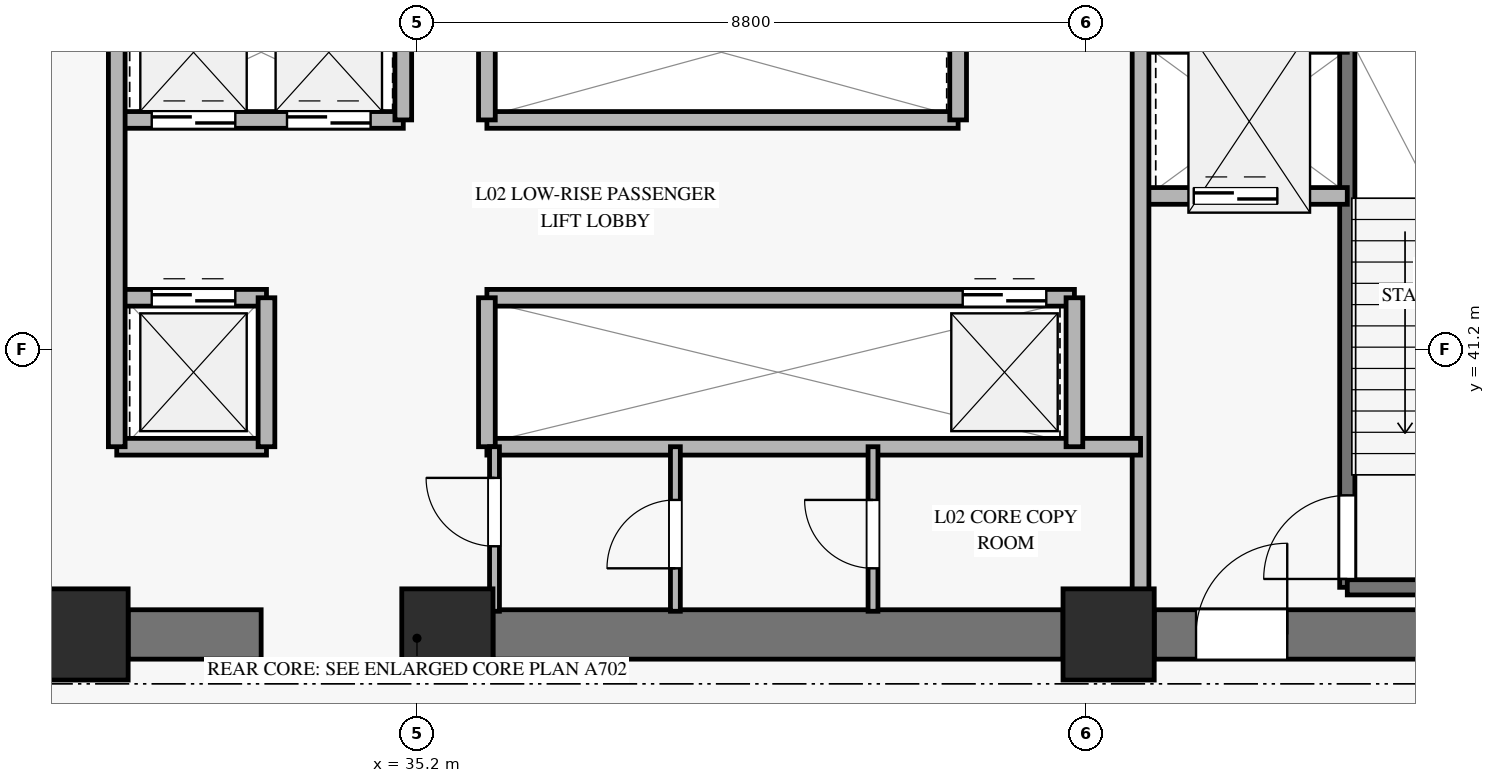
"""IFC4 building model, lengths in metres.
Left out: names, types, materials, properties, quantities, classifications, styles, units other than length and angle.
Written with IfcOpenShell. Run it as: python <this file> out.ifc"""

import sys

from ifc_helpers import new_model, si_unit, direction, frame, frame_2d, origin, origin_2d, place, context, subcontext, project, spatial, rectangle, extrude, source, transform, mapped, element, fill, save


model = new_model("IFC4")
c1 = context("Model", 3, precision=1e-05, world=origin(), true_north=direction((0.0, 1.0)))
c2 = subcontext(c1, "Body", "Model", "MODEL_VIEW")
j1 = project(units=[si_unit("LENGTHUNIT", "METRE"), si_unit("PLANEANGLEUNIT", "RADIAN")], contexts=[c1])
p1 = place(None, origin())
s1 = spatial("IfcSite", under=j1, at=p1, CompositionType="ELEMENT")
p2 = place(p1, origin())
s2 = spatial("IfcBuilding", under=s1, at=p2, CompositionType="ELEMENT")
p3 = place(p2, frame((0.0, 0.0, 5.6)))
s3 = spatial("IfcBuildingStorey", under=s2, at=p3, CompositionType="ELEMENT", Elevation=5.6)
m1 = source(origin(), c2, "Body", "SweptSolid", [
    extrude(rectangle(XDim=1.2, YDim=1.2, at=origin_2d()), origin(), (0.0, 0.0, 1.0), 4.54),
])
for number, where, z_axis, x_axis in (
    (1, (30.8, 37.45, 0.0), (0.0, 0.0, 1.0), (1.0, 0.0, 0.0)),
    (2, (35.6, 37.45, 0.0), (0.0, 0.0, 1.0), (1.0, 0.0, 0.0)),
    (3, (44.3, 37.45, 0.0), (0.0, 0.0, 1.0), (1.0, 0.0, 0.0)),
):
    element("IfcColumn", number, at=place(p3, frame(where, z_axis=z_axis, x_axis=x_axis)), inside=s3, PredefinedType="PILASTER", context=c2, shape_type="MappedRepresentation", body=[
        mapped(m1, transform((0.0, 0.0, 0.0), x_axis=(1.0, 0.0, 0.0), y_axis=(0.0, 1.0, 0.0), z_axis=(0.0, 0.0, 1.0), scale=1.0)),
    ])
p4 = place(p3, frame((31.4, 37.45, 0.0), z_axis=(0.0, 0.0, 1.0), x_axis=(1.0, 0.0, 0.0)))
e4 = element("IfcWall", 4, at=p4, inside=s3, PredefinedType="SHEAR", context=c2, shape_type="SweptSolid", body=[
    extrude(rectangle(XDim=1.75, YDim=0.65, at=frame_2d((0.875, 0.0))), origin(), (0.0, 0.0, 1.0), 4.54),
])
p5 = place(p3, frame((36.2, 37.45, 0.0), z_axis=(0.0, 0.0, 1.0), x_axis=(1.0, 0.0, 0.0)))
e5 = element("IfcWall", 5, at=p5, inside=s3, PredefinedType="SHEAR", context=c2, shape_type="SweptSolid", body=[
    extrude(rectangle(XDim=7.5, YDim=0.65, at=frame_2d((3.75, 0.0))), origin(), (0.0, 0.0, 1.0), 4.54),
])
p6 = place(p3, frame((44.9, 37.45, 0.0), z_axis=(0.0, 0.0, 1.0), x_axis=(1.0, 0.0, 0.0)))
e6 = element("IfcWall", 6, at=p6, inside=s3, PredefinedType="SHEAR", context=c2, shape_type="SweptSolid", body=[
    extrude(rectangle(XDim=5.05, YDim=0.65, at=frame_2d((2.525, 0.0))), origin(), (0.0, 0.0, 1.0), 4.54),
])
p7 = place(p6, frame((0.55, 0.0, 0.0)))
e7 = element("IfcOpeningElement", 7, at=p7, cuts=e6, PredefinedType="OPENING", context=c2, shape_type="SweptSolid", body=[
    extrude(rectangle(XDim=1.2, YDim=2.15, at=frame_2d((0.6, 1.075))), frame((0.0, 0.335, 0.0), z_axis=(0.0, -1.0, 0.0), x_axis=(1.0, 0.0, 0.0)), (0.0, 0.0, 1.0), 0.67),
])
p8 = place(p3, frame((47.44, 38.07, 0.0), z_axis=(0.0, 0.0, 1.0), x_axis=(0.0, 1.0, 0.0)))
e8 = element("IfcWall", 8, at=p8, inside=s3, PredefinedType="SOLIDWALL", context=c2, shape_type="SweptSolid", body=[
    extrude(rectangle(XDim=7.25, YDim=0.2, at=frame_2d((3.625, 0.0))), origin(), (0.0, 0.0, 1.0), 4.8),
])
p9 = place(p8, frame((0.11, 0.0, 0.0)))
e9 = element("IfcOpeningElement", 9, at=p9, cuts=e8, PredefinedType="OPENING", context=c2, shape_type="SweptSolid", body=[
    extrude(rectangle(XDim=1.1, YDim=2.15, at=frame_2d((0.55, 1.075))), frame((0.0, 0.11, 0.0), z_axis=(0.0, -1.0, 0.0), x_axis=(1.0, 0.0, 0.0)), (0.0, 0.0, 1.0), 0.22),
])
p10 = place(p3, frame((47.44, 38.07, 0.0), z_axis=(0.0, 0.0, 1.0), x_axis=(1.0, 0.0, 0.0)))
e10 = element("IfcWall", 10, at=p10, inside=s3, PredefinedType="SOLIDWALL", context=c2, shape_type="SweptSolid", body=[
    extrude(rectangle(XDim=2.805, YDim=0.2, at=frame_2d((1.403, 0.0))), origin(), (0.0, 0.0, 1.0), 4.8),
])
p11 = place(p3, frame((44.72, 43.22, 0.0), z_axis=(0.0, 0.0, 1.0), x_axis=(1.0, 0.0, 0.0)))
e11 = element("IfcWall", 11, at=p11, inside=s3, PredefinedType="SOLIDWALL", context=c2, shape_type="SweptSolid", body=[
    extrude(rectangle(XDim=2.72, YDim=0.22, at=frame_2d((1.36, 0.0))), origin(), (0.0, 0.0, 1.0), 4.54),
])
p12 = place(p11, frame((0.7, 0.0, 0.0)))
e12 = element("IfcOpeningElement", 12, at=p12, cuts=e11, PredefinedType="OPENING", context=c2, shape_type="SweptSolid", body=[
    extrude(rectangle(XDim=1.1, YDim=2.2, at=frame_2d((0.55, 1.1))), frame((0.0, 0.12, 0.0), z_axis=(0.0, -1.0, 0.0), x_axis=(1.0, 0.0, 0.0)), (0.0, 0.0, 1.0), 0.24),
])
p13 = place(p3, frame((44.72, 45.22, 0.0), z_axis=(0.0, 0.0, 1.0), x_axis=(1.0, 0.0, 0.0)))
e13 = element("IfcWall", 13, at=p13, inside=s3, PredefinedType="SOLIDWALL", context=c2, shape_type="SweptSolid", body=[
    extrude(rectangle(XDim=2.72, YDim=0.22, at=frame_2d((1.36, 0.0))), origin(), (0.0, 0.0, 1.0), 4.54),
])
p14 = place(p3, frame((44.72, 37.755, 0.0), z_axis=(0.0, 0.0, 1.0), x_axis=(0.0, 1.0, 0.0)))
e14 = element("IfcWall", 14, at=p14, inside=s3, PredefinedType="SOLIDWALL", context=c2, shape_type="SweptSolid", body=[
    extrude(rectangle(XDim=7.465, YDim=0.22, at=frame_2d((3.732, 0.0))), origin(), (0.0, 0.0, 1.0), 4.54),
])
p15 = place(p3, frame((31.25, 44.22, 0.0), z_axis=(0.0, 0.0, 1.0), x_axis=(1.0, 0.0, 0.0)))
e15 = element("IfcWall", 15, at=p15, inside=s3, PredefinedType="SOLIDWALL", context=c2, shape_type="SweptSolid", body=[
    extrude(rectangle(XDim=3.77, YDim=0.22, at=frame_2d((1.885, 0.0))), origin(), (0.0, 0.0, 1.0), 4.54),
])
p16 = place(p15, frame((0.46, 0.0, 0.0)))
e16 = element("IfcOpeningElement", 16, at=p16, cuts=e15, PredefinedType="OPENING", context=c2, shape_type="SweptSolid", body=[
    extrude(rectangle(XDim=1.1, YDim=2.2, at=frame_2d((0.55, 1.1))), frame((0.0, 0.12, 0.0), z_axis=(0.0, -1.0, 0.0), x_axis=(1.0, 0.0, 0.0)), (0.0, 0.0, 1.0), 0.24),
])
p17 = place(p15, frame((2.24, 0.0, 0.0)))
e17 = element("IfcOpeningElement", 17, at=p17, cuts=e15, PredefinedType="OPENING", context=c2, shape_type="SweptSolid", body=[
    extrude(rectangle(XDim=1.1, YDim=2.2, at=frame_2d((0.55, 1.1))), frame((0.0, 0.12, 0.0), z_axis=(0.0, -1.0, 0.0), x_axis=(1.0, 0.0, 0.0)), (0.0, 0.0, 1.0), 0.24),
])
p18 = place(p3, frame((36.12, 44.22, 0.0), z_axis=(0.0, 0.0, 1.0), x_axis=(1.0, 0.0, 0.0)))
e18 = element("IfcWall", 18, at=p18, inside=s3, PredefinedType="SOLIDWALL", context=c2, shape_type="SweptSolid", body=[
    extrude(rectangle(XDim=6.2, YDim=0.22, at=frame_2d((3.1, 0.0))), origin(), (0.0, 0.0, 1.0), 4.54),
])
for number, where, z_axis, x_axis in (
    (19, (35.02, 44.22, 0.0), (0.0, 0.0, 1.0), (0.0, 1.0, 0.0)),
    (20, (36.12, 44.22, 0.0), (0.0, 0.0, 1.0), (0.0, 1.0, 0.0)),
    (21, (42.32, 44.22, 0.0), (0.0, 0.0, 1.0), (0.0, 1.0, 0.0)),
):
    element("IfcWall", number, at=place(p3, frame(where, z_axis=z_axis, x_axis=x_axis)), inside=s3, PredefinedType="SOLIDWALL", context=c2, shape_type="SweptSolid", body=[
        extrude(rectangle(XDim=2.025, YDim=0.22, at=frame_2d((1.013, 0.0))), origin(), (0.0, 0.0, 1.0), 4.54),
    ])
p19 = place(p3, frame((31.25, 41.88, 0.0), z_axis=(0.0, 0.0, 1.0), x_axis=(1.0, 0.0, 0.0)))
e22 = element("IfcWall", 22, at=p19, inside=s3, PredefinedType="SOLIDWALL", context=c2, shape_type="SweptSolid", body=[
    extrude(rectangle(XDim=1.97, YDim=0.22, at=frame_2d((0.985, 0.0))), origin(), (0.0, 0.0, 1.0), 4.54),
])
p20 = place(p19, frame((0.46, 0.0, 0.0)))
e23 = element("IfcOpeningElement", 23, at=p20, cuts=e22, PredefinedType="OPENING", context=c2, shape_type="SweptSolid", body=[
    extrude(rectangle(XDim=1.1, YDim=2.2, at=frame_2d((0.55, 1.1))), frame((0.0, 0.12, 0.0), z_axis=(0.0, -1.0, 0.0), x_axis=(1.0, 0.0, 0.0)), (0.0, 0.0, 1.0), 0.24),
])
p21 = place(p3, frame((36.12, 41.88, 0.0), z_axis=(0.0, 0.0, 1.0), x_axis=(1.0, 0.0, 0.0)))
e24 = element("IfcWall", 24, at=p21, inside=s3, PredefinedType="SOLIDWALL", context=c2, shape_type="SweptSolid", body=[
    extrude(rectangle(XDim=7.73, YDim=0.22, at=frame_2d((3.865, 0.0))), origin(), (0.0, 0.0, 1.0), 4.54),
])
p22 = place(p21, frame((6.26, 0.0, 0.0)))
e25 = element("IfcOpeningElement", 25, at=p22, cuts=e24, PredefinedType="OPENING", context=c2, shape_type="SweptSolid", body=[
    extrude(rectangle(XDim=1.1, YDim=2.2, at=frame_2d((0.55, 1.1))), frame((0.0, 0.12, 0.0), z_axis=(0.0, -1.0, 0.0), x_axis=(1.0, 0.0, 0.0)), (0.0, 0.0, 1.0), 0.24),
])
p23 = place(p3, frame((31.25, 39.92, 0.0), z_axis=(0.0, 0.0, 1.0), x_axis=(1.0, 0.0, 0.0)))
e26 = element("IfcWall", 26, at=p23, inside=s3, PredefinedType="SOLIDWALL", context=c2, shape_type="SweptSolid", body=[
    extrude(rectangle(XDim=1.97, YDim=0.22, at=frame_2d((0.985, 0.0))), origin(), (0.0, 0.0, 1.0), 4.54),
])
p24 = place(p3, frame((33.22, 39.92, 0.0), z_axis=(0.0, 0.0, 1.0), x_axis=(0.0, 1.0, 0.0)))
e27 = element("IfcWall", 27, at=p24, inside=s3, PredefinedType="SOLIDWALL", context=c2, shape_type="SweptSolid", body=[
    extrude(rectangle(XDim=1.96, YDim=0.22, at=frame_2d((0.98, 0.0))), origin(), (0.0, 0.0, 1.0), 4.54),
])
p25 = place(p3, frame((36.12, 39.92, 0.0), z_axis=(0.0, 0.0, 1.0), x_axis=(1.0, 0.0, 0.0)))
e28 = element("IfcWall", 28, at=p25, inside=s3, PredefinedType="SOLIDWALL", context=c2, shape_type="SweptSolid", body=[
    extrude(rectangle(XDim=8.6, YDim=0.22, at=frame_2d((4.3, 0.0))), origin(), (0.0, 0.0, 1.0), 3.825),
])
p26 = place(p3, frame((36.12, 39.92, 0.0), z_axis=(0.0, 0.0, 1.0), x_axis=(0.0, 1.0, 0.0)))
e29 = element("IfcWall", 29, at=p26, inside=s3, PredefinedType="SOLIDWALL", context=c2, shape_type="SweptSolid", body=[
    extrude(rectangle(XDim=1.96, YDim=0.22, at=frame_2d((0.98, 0.0))), origin(), (0.0, 0.0, 1.0), 4.54),
])
p27 = place(p3, frame((31.25, 39.92, 0.0), z_axis=(0.0, 0.0, 1.0), x_axis=(0.0, 1.0, 0.0)))
e30 = element("IfcWall", 30, at=p27, inside=s3, PredefinedType="SOLIDWALL", context=c2, shape_type="SweptSolid", body=[
    extrude(rectangle(XDim=6.325, YDim=0.22, at=frame_2d((3.163, 0.0))), origin(), (0.0, 0.0, 1.0), 4.54),
])
p28 = place(p3, frame((43.85, 39.92, 0.0), z_axis=(0.0, 0.0, 1.0), x_axis=(0.0, 1.0, 0.0)))
e31 = element("IfcWall", 31, at=p28, inside=s3, PredefinedType="SOLIDWALL", context=c2, shape_type="SweptSolid", body=[
    extrude(rectangle(XDim=1.96, YDim=0.22, at=frame_2d((0.98, 0.0))), origin(), (0.0, 0.0, 1.0), 4.54),
])
p29 = place(p3, frame((36.22, 37.755, 0.0), z_axis=(0.0, 0.0, 1.0), x_axis=(0.0, 1.0, 0.0)))
e32 = element("IfcWall", 32, at=p29, inside=s3, PredefinedType="PARTITIONING", context=c2, shape_type="SweptSolid", body=[
    extrude(rectangle(XDim=2.165, YDim=0.13, at=frame_2d((1.083, 0.0))), origin(), (0.0, 0.0, 1.0), 4.54),
])
p30 = place(p29, frame((0.855, 0.0, 0.0)))
e33 = element("IfcOpeningElement", 33, at=p30, cuts=e32, PredefinedType="OPENING", context=c2, shape_type="SweptSolid", body=[
    extrude(rectangle(XDim=0.9, YDim=2.1, at=frame_2d((0.45, 1.05))), frame((0.0, 0.075, 0.0), z_axis=(0.0, -1.0, 0.0), x_axis=(1.0, 0.0, 0.0)), (0.0, 0.0, 1.0), 0.15),
])
p31 = place(p3, frame((38.6, 37.755, 0.0), z_axis=(0.0, 0.0, 1.0), x_axis=(0.0, 1.0, 0.0)))
e34 = element("IfcWall", 34, at=p31, inside=s3, PredefinedType="PARTITIONING", context=c2, shape_type="SweptSolid", body=[
    extrude(rectangle(XDim=2.165, YDim=0.13, at=frame_2d((1.083, 0.0))), origin(), (0.0, 0.0, 1.0), 4.54),
])
p32 = place(p31, frame((0.565, 0.0, 0.0)))
e35 = element("IfcOpeningElement", 35, at=p32, cuts=e34, PredefinedType="OPENING", context=c2, shape_type="SweptSolid", body=[
    extrude(rectangle(XDim=0.9, YDim=2.1, at=frame_2d((0.45, 1.05))), frame((0.0, 0.075, 0.0), z_axis=(0.0, -1.0, 0.0), x_axis=(1.0, 0.0, 0.0)), (0.0, 0.0, 1.0), 0.15),
])
p33 = place(p3, frame((41.2, 37.755, 0.0), z_axis=(0.0, 0.0, 1.0), x_axis=(0.0, 1.0, 0.0)))
e36 = element("IfcWall", 36, at=p33, inside=s3, PredefinedType="PARTITIONING", context=c2, shape_type="SweptSolid", body=[
    extrude(rectangle(XDim=2.165, YDim=0.13, at=frame_2d((1.083, 0.0))), origin(), (0.0, 0.0, 1.0), 4.54),
])
p34 = place(p33, frame((0.565, 0.0, 0.0)))
e37 = element("IfcOpeningElement", 37, at=p34, cuts=e36, PredefinedType="OPENING", context=c2, shape_type="SweptSolid", body=[
    extrude(rectangle(XDim=0.9, YDim=2.1, at=frame_2d((0.45, 1.05))), frame((0.0, 0.075, 0.0), z_axis=(0.0, -1.0, 0.0), x_axis=(1.0, 0.0, 0.0)), (0.0, 0.0, 1.0), 0.15),
])
m2 = source(origin(), c2, "Body", "SweptSolid", [
    extrude(rectangle(XDim=1.1, YDim=2.15, at=frame_2d((0.55, 1.075))), frame((0.0, 0.025, 0.0), z_axis=(0.0, -1.0, 0.0), x_axis=(1.0, 0.0, 0.0)), (0.0, 0.0, 1.0), 0.05),
])
p35 = place(p9, origin())
e38 = element("IfcDoor", 38, at=p35, inside=s3, OperationType="SINGLE_SWING_LEFT", PredefinedType="DOOR", context=c2, shape_type="MappedRepresentation", body=[
    mapped(m2, transform((0.0, 0.0, 0.0), x_axis=(1.0, 0.0, 0.0), y_axis=(0.0, 1.0, 0.0), z_axis=(0.0, 0.0, 1.0), scale=1.0)),
])
fill(e9, e38)
m3 = source(origin(), c2, "Body", "SweptSolid", [
    extrude(rectangle(XDim=1.1, YDim=2.2, at=frame_2d((0.55, 1.1))), frame((0.0, 0.025, 0.0), z_axis=(0.0, -1.0, 0.0), x_axis=(1.0, 0.0, 0.0)), (0.0, 0.0, 1.0), 0.05),
])
p36 = place(p12, origin())
e39 = element("IfcDoor", 39, at=p36, inside=s3, OperationType="SLIDING_TO_LEFT", PredefinedType="DOOR", context=c2, shape_type="MappedRepresentation", body=[
    mapped(m3, transform((0.0, 0.0, 0.0), x_axis=(1.0, 0.0, 0.0), y_axis=(0.0, 1.0, 0.0), z_axis=(0.0, 0.0, 1.0), scale=1.0)),
])
fill(e12, e39)
m4 = source(origin(), c2, "Body", "SweptSolid", [
    extrude(rectangle(XDim=1.2, YDim=2.15, at=frame_2d((0.6, 1.075))), frame((0.0, 0.025, 0.0), z_axis=(0.0, -1.0, 0.0), x_axis=(1.0, 0.0, 0.0)), (0.0, 0.0, 1.0), 0.05),
])
p37 = place(p7, origin())
e40 = element("IfcDoor", 40, at=p37, inside=s3, OperationType="SINGLE_SWING_RIGHT", PredefinedType="DOOR", context=c2, shape_type="MappedRepresentation", body=[
    mapped(m4, transform((0.0, 0.0, 0.0), x_axis=(1.0, 0.0, 0.0), y_axis=(0.0, 1.0, 0.0), z_axis=(0.0, 0.0, 1.0), scale=1.0)),
])
fill(e7, e40)
p38 = place(p16, origin())
e41 = element("IfcDoor", 41, at=p38, inside=s3, OperationType="SLIDING_TO_LEFT", PredefinedType="DOOR", context=c2, shape_type="MappedRepresentation", body=[
    mapped(m3, transform((0.0, 0.0, 0.0), x_axis=(1.0, 0.0, 0.0), y_axis=(0.0, 1.0, 0.0), z_axis=(0.0, 0.0, 1.0), scale=1.0)),
])
fill(e16, e41)
p39 = place(p17, origin())
e42 = element("IfcDoor", 42, at=p39, inside=s3, OperationType="SLIDING_TO_LEFT", PredefinedType="DOOR", context=c2, shape_type="MappedRepresentation", body=[
    mapped(m3, transform((0.0, 0.0, 0.0), x_axis=(1.0, 0.0, 0.0), y_axis=(0.0, 1.0, 0.0), z_axis=(0.0, 0.0, 1.0), scale=1.0)),
])
fill(e17, e42)
p40 = place(p20, origin())
e43 = element("IfcDoor", 43, at=p40, inside=s3, OperationType="SLIDING_TO_LEFT", PredefinedType="DOOR", context=c2, shape_type="MappedRepresentation", body=[
    mapped(m3, transform((0.0, 0.0, 0.0), x_axis=(1.0, 0.0, 0.0), y_axis=(0.0, 1.0, 0.0), z_axis=(0.0, 0.0, 1.0), scale=1.0)),
])
fill(e23, e43)
p41 = place(p22, origin())
e44 = element("IfcDoor", 44, at=p41, inside=s3, OperationType="SLIDING_TO_LEFT", PredefinedType="DOOR", context=c2, shape_type="MappedRepresentation", body=[
    mapped(m3, transform((0.0, 0.0, 0.0), x_axis=(1.0, 0.0, 0.0), y_axis=(0.0, 1.0, 0.0), z_axis=(0.0, 0.0, 1.0), scale=1.0)),
])
fill(e25, e44)
m5 = source(origin(), c2, "Body", "SweptSolid", [
    extrude(rectangle(XDim=0.9, YDim=2.1, at=frame_2d((0.45, 1.05))), frame((0.0, 0.025, 0.0), z_axis=(0.0, -1.0, 0.0), x_axis=(1.0, 0.0, 0.0)), (0.0, 0.0, 1.0), 0.05),
])
p42 = place(p30, origin())
e45 = element("IfcDoor", 45, at=p42, inside=s3, OperationType="SINGLE_SWING_RIGHT", PredefinedType="DOOR", context=c2, shape_type="MappedRepresentation", body=[
    mapped(m5, transform((0.0, 0.0, 0.0), x_axis=(1.0, 0.0, 0.0), y_axis=(0.0, 1.0, 0.0), z_axis=(0.0, 0.0, 1.0), scale=1.0)),
])
fill(e33, e45)
p43 = place(p32, origin())
e46 = element("IfcDoor", 46, at=p43, inside=s3, OperationType="SINGLE_SWING_LEFT", PredefinedType="DOOR", context=c2, shape_type="MappedRepresentation", body=[
    mapped(m5, transform((0.0, 0.0, 0.0), x_axis=(1.0, 0.0, 0.0), y_axis=(0.0, 1.0, 0.0), z_axis=(0.0, 0.0, 1.0), scale=1.0)),
])
fill(e35, e46)
p44 = place(p34, origin())
e47 = element("IfcDoor", 47, at=p44, inside=s3, OperationType="SINGLE_SWING_RIGHT", PredefinedType="DOOR", context=c2, shape_type="MappedRepresentation", body=[
    mapped(m5, transform((0.0, 0.0, 0.0), x_axis=(1.0, 0.0, 0.0), y_axis=(0.0, 1.0, 0.0), z_axis=(0.0, 0.0, 1.0), scale=1.0)),
])
fill(e37, e47)
save(model, sys.argv[1])
